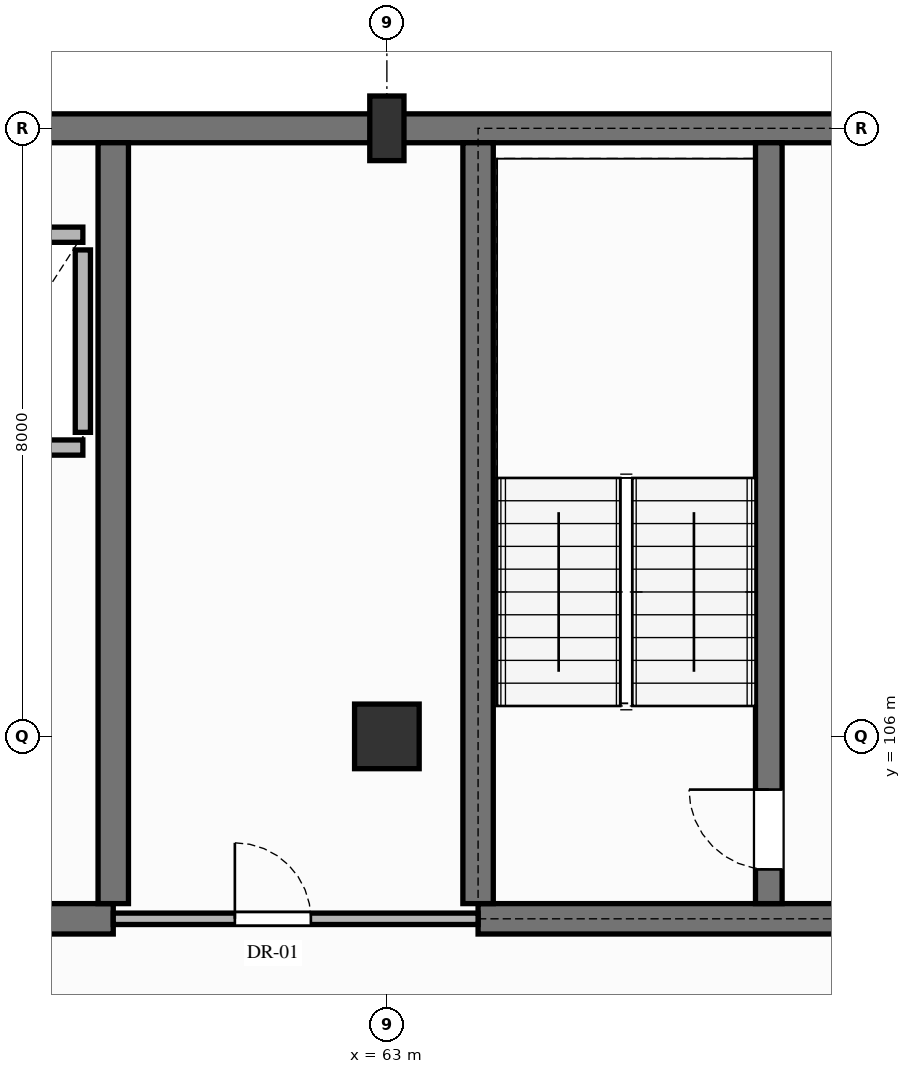
"""IFC4 building model, lengths in metres.
Left out: names, types, materials, properties, quantities, classifications, styles, units other than length and angle.
Written with IfcOpenShell. Run it as: python <this file> out.ifc"""

import sys

from ifc_helpers import new_model, si_unit, direction, frame, frame_2d, origin, origin_2d, place, context, subcontext, project, spatial, rectangle, extrude, element, fill, save


model = new_model("IFC4")
c1 = context("Model", 3, precision=1e-05, world=origin(), true_north=direction((0.0, 1.0)))
c2 = subcontext(c1, "Body", "Model", "MODEL_VIEW")
j1 = project(units=[si_unit("LENGTHUNIT", "METRE"), si_unit("PLANEANGLEUNIT", "RADIAN")], contexts=[c1])
p1 = place(None, origin())
s1 = spatial("IfcSite", under=j1, at=p1, CompositionType="ELEMENT")
p2 = place(p1, origin())
s2 = spatial("IfcBuilding", under=s1, at=p2, CompositionType="ELEMENT")
p3 = place(p2, frame((0.0, 0.0, 5.1)))
s3 = spatial("IfcBuildingStorey", under=s2, at=p3, CompositionType="ELEMENT", Elevation=5.1)
p4 = place(p3, frame((63.0, 106.0, 0.0), z_axis=(0.0, 0.0, 1.0), x_axis=(1.0, 0.0, 0.0)))
e1 = element("IfcColumn", 1, at=p4, inside=s3, PredefinedType="COLUMN", context=c2, shape_type="SweptSolid", body=[
    extrude(rectangle(XDim=0.85, YDim=0.85, at=origin_2d()), origin(), (0.0, 0.0, 1.0), 3.84),
])
p5 = place(p3, frame((63.0, 114.0, 0.0), z_axis=(0.0, 0.0, 1.0), x_axis=(0.0, 1.0, 0.0)))
e2 = element("IfcColumn", 2, at=p5, inside=s3, PredefinedType="COLUMN", context=c2, shape_type="SweptSolid", body=[
    extrude(rectangle(XDim=0.45, YDim=0.85, at=origin_2d()), origin(), (0.0, 0.0, 1.0), 3.84),
])
for number, where, z_axis, x_axis in (
    (3, (54.0, 114.0, 0.0), (0.0, 0.0, 1.0), (1.0, 0.0, 0.0)),
    (4, (63.0, 114.0, 0.0), (0.0, 0.0, 1.0), (1.0, 0.0, 0.0)),
):
    element("IfcWall", number, at=place(p3, frame(where, z_axis=z_axis, x_axis=x_axis)), inside=s3, PredefinedType="SOLIDWALL", context=c2, shape_type="SweptSolid", body=[
        extrude(rectangle(XDim=9.0, YDim=0.38, at=frame_2d((4.5, 0.0))), origin(), (0.0, 0.0, 1.0), 3.55),
    ])
p6 = place(p3, frame((46.2, 103.6, 0.0), z_axis=(0.0, 0.0, 1.0), x_axis=(1.0, 0.0, 0.0)))
e5 = element("IfcWall", 5, at=p6, inside=s3, PredefinedType="SHEAR", context=c2, shape_type="SweptSolid", body=[
    extrude(rectangle(XDim=13.2, YDim=0.4, at=frame_2d((6.6, 0.0))), origin(), (0.0, 0.0, 1.0), 3.55),
])
p7 = place(p6, frame((5.8, 0.0, 0.0)))
e6 = element("IfcOpeningElement", 6, at=p7, cuts=e5, PredefinedType="OPENING", context=c2, shape_type="SweptSolid", body=[
    extrude(rectangle(XDim=1.5, YDim=2.2, at=frame_2d((0.75, 1.1))), frame((0.0, 0.21, 0.0), z_axis=(0.0, -1.0, 0.0), x_axis=(1.0, 0.0, 0.0)), (0.0, 0.0, 1.0), 0.42),
])
p8 = place(p3, frame((59.4, 103.8, 0.0), z_axis=(0.0, 0.0, 1.0), x_axis=(0.0, 1.0, 0.0)))
e7 = element("IfcWall", 7, at=p8, inside=s3, PredefinedType="SHEAR", context=c2, shape_type="SweptSolid", body=[
    extrude(rectangle(XDim=10.01, YDim=0.4, at=frame_2d((5.005, 0.0))), origin(), (0.0, 0.0, 1.0), 3.55),
])
p9 = place(p3, frame((57.2, 109.8, 0.0), z_axis=(0.0, 0.0, 1.0), x_axis=(1.0, 0.0, 0.0)))
e8 = element("IfcWall", 8, at=p9, inside=s3, PredefinedType="PARTITIONING", context=c2, shape_type="SweptSolid", body=[
    extrude(rectangle(XDim=1.8, YDim=0.2, at=frame_2d((0.9, 0.0))), origin(), (0.0, 0.0, 1.0), 3.55),
])
p10 = place(p9, frame((0.45, 0.0, 0.0)))
e9 = element("IfcOpeningElement", 9, at=p10, cuts=e8, PredefinedType="OPENING", context=c2, shape_type="SweptSolid", body=[
    extrude(rectangle(XDim=0.9, YDim=2.1, at=frame_2d((0.45, 1.05))), frame((0.0, 0.11, 0.0), z_axis=(0.0, -1.0, 0.0), x_axis=(1.0, 0.0, 0.0)), (0.0, 0.0, 1.0), 0.22),
])
p11 = place(p3, frame((57.2, 112.6, 0.0), z_axis=(0.0, 0.0, 1.0), x_axis=(1.0, 0.0, 0.0)))
e10 = element("IfcWall", 10, at=p11, inside=s3, PredefinedType="PARTITIONING", context=c2, shape_type="SweptSolid", body=[
    extrude(rectangle(XDim=1.8, YDim=0.2, at=frame_2d((0.9, 0.0))), origin(), (0.0, 0.0, 1.0), 3.55),
])
p12 = place(p3, frame((59.0, 110.0, 0.0), z_axis=(0.0, 0.0, 1.0), x_axis=(0.0, 1.0, 0.0)))
e11 = element("IfcWall", 11, at=p12, inside=s3, PredefinedType="PARTITIONING", context=c2, shape_type="SweptSolid", body=[
    extrude(rectangle(XDim=2.4, YDim=0.2, at=frame_2d((1.2, 0.0))), origin(), (0.0, 0.0, 1.0), 3.55),
])
p13 = place(p3, frame((64.2, 103.6, 0.0), z_axis=(0.0, 0.0, 1.0), x_axis=(1.0, 0.0, 0.0)))
e12 = element("IfcWall", 12, at=p13, inside=s3, PredefinedType="SHEAR", context=c2, shape_type="SweptSolid", body=[
    extrude(rectangle(XDim=13.2, YDim=0.4, at=frame_2d((6.6, 0.0))), origin(), (0.0, 0.0, 1.0), 3.55),
])
p14 = place(p13, frame((5.8, 0.0, 0.0)))
e13 = element("IfcOpeningElement", 13, at=p14, cuts=e12, PredefinedType="OPENING", context=c2, shape_type="SweptSolid", body=[
    extrude(rectangle(XDim=1.5, YDim=2.2, at=frame_2d((0.75, 1.1))), frame((0.0, 0.21, 0.0), z_axis=(0.0, -1.0, 0.0), x_axis=(1.0, 0.0, 0.0)), (0.0, 0.0, 1.0), 0.42),
])
p15 = place(p3, frame((64.2, 103.8, 0.0), z_axis=(0.0, 0.0, 1.0), x_axis=(0.0, 1.0, 0.0)))
e14 = element("IfcWall", 14, at=p15, inside=s3, PredefinedType="SHEAR", context=c2, shape_type="SweptSolid", body=[
    extrude(rectangle(XDim=10.01, YDim=0.4, at=frame_2d((5.005, 0.0))), origin(), (0.0, 0.0, 1.0), 3.55),
])
p16 = place(p3, frame((68.025, 103.8, 0.0), z_axis=(0.0, 0.0, 1.0), x_axis=(0.0, 1.0, 0.0)))
e15 = element("IfcWall", 15, at=p16, inside=s3, PredefinedType="SHEAR", context=c2, shape_type="SweptSolid", body=[
    extrude(rectangle(XDim=10.01, YDim=0.35, at=frame_2d((5.005, 0.0))), origin(), (0.0, 0.0, 1.0), 3.55),
])
p17 = place(p16, frame((0.45, 0.0, 0.0)))
e16 = element("IfcOpeningElement", 16, at=p17, cuts=e15, PredefinedType="OPENING", context=c2, shape_type="SweptSolid", body=[
    extrude(rectangle(XDim=1.05, YDim=2.2, at=frame_2d((0.525, 1.1))), frame((0.0, 0.185, 0.0), z_axis=(0.0, -1.0, 0.0), x_axis=(1.0, 0.0, 0.0)), (0.0, 0.0, 1.0), 0.37),
])
p18 = place(p3, frame((59.4, 103.6, 0.0), z_axis=(0.0, 0.0, 1.0), x_axis=(1.0, 0.0, 0.0)))
e17 = element("IfcWall", 17, at=p18, inside=s3, PredefinedType="PARTITIONING", context=c2, shape_type="SweptSolid", body=[
    extrude(rectangle(XDim=4.8, YDim=0.15, at=frame_2d((2.4, 0.0))), origin(), (0.0, 0.0, 1.0), 3.55),
])
p19 = place(p18, frame((1.6, 0.0, 0.0)))
e18 = element("IfcOpeningElement", 18, at=p19, cuts=e17, PredefinedType="OPENING", context=c2, shape_type="SweptSolid", body=[
    extrude(rectangle(XDim=1.0, YDim=2.15, at=frame_2d((0.5, 1.075))), frame((0.0, 0.085, 0.0), z_axis=(0.0, -1.0, 0.0), x_axis=(1.0, 0.0, 0.0)), (0.0, 0.0, 1.0), 0.17),
])
p20 = place(p17, origin())
e19 = element("IfcDoor", 19, at=p20, inside=s3, OperationType="SINGLE_SWING_RIGHT", PredefinedType="DOOR", context=c2, shape_type="SweptSolid", body=[
    extrude(rectangle(XDim=1.05, YDim=2.2, at=frame_2d((0.525, 1.1))), frame((0.0, 0.025, 0.0), z_axis=(0.0, -1.0, 0.0), x_axis=(1.0, 0.0, 0.0)), (0.0, 0.0, 1.0), 0.05),
])
fill(e16, e19)
p21 = place(p19, origin())
e20 = element("IfcDoor", 20, at=p21, inside=s3, OperationType="SINGLE_SWING_LEFT", PredefinedType="DOOR", context=c2, shape_type="SweptSolid", body=[
    extrude(rectangle(XDim=1.0, YDim=2.15, at=frame_2d((0.5, 1.075))), frame((0.0, 0.025, 0.0), z_axis=(0.0, -1.0, 0.0), x_axis=(1.0, 0.0, 0.0)), (0.0, 0.0, 1.0), 0.05),
])
fill(e18, e20)
save(model, sys.argv[1])
